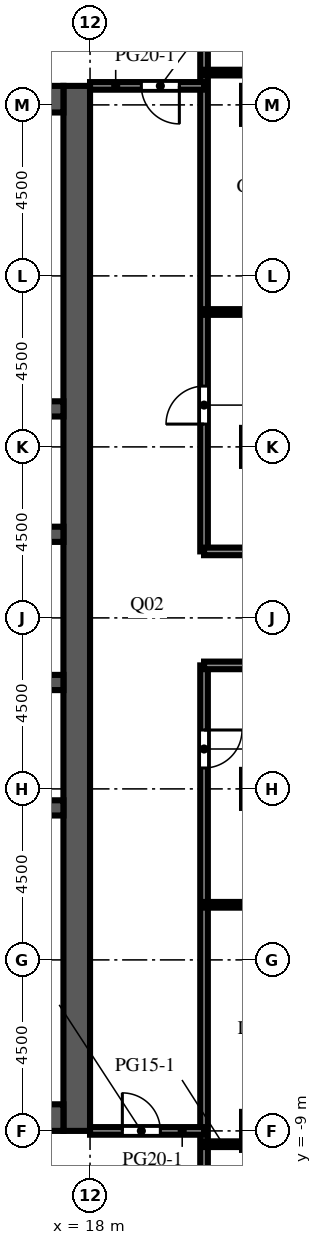
"""IFC4 building model, lengths in metres.
Left out: names, types, materials, properties, quantities, classifications, styles, units other than length and angle.
Written with IfcOpenShell. Run it as: python <this file> out.ifc"""

import sys

from ifc_helpers import new_model, si_unit, direction, frame, frame_2d, origin, place, context, subcontext, project, spatial, rectangle, extrude, element, fill, save


model = new_model("IFC4")
c1 = context("Model", 3, precision=1e-05, world=origin(), true_north=direction((0.0, 1.0)))
c2 = subcontext(c1, "Body", "Model", "MODEL_VIEW")
j1 = project(units=[si_unit("LENGTHUNIT", "METRE"), si_unit("PLANEANGLEUNIT", "RADIAN")], contexts=[c1])
p1 = place(None, origin())
s1 = spatial("IfcSite", under=j1, at=p1, CompositionType="ELEMENT")
p2 = place(p1, origin())
s2 = spatial("IfcBuilding", under=s1, at=p2, CompositionType="ELEMENT")
p3 = place(p2, frame((0.0, 0.0, 231.6)))
s3 = spatial("IfcBuildingStorey", under=s2, at=p3, CompositionType="ELEMENT", Elevation=231.6)
p4 = place(p3, frame((17.65, -9.0, 0.0), z_axis=(0.0, 0.0, 1.0), x_axis=(0.0, 1.0, 0.0)))
e1 = element("IfcWall", 1, at=p4, inside=s3, PredefinedType="SHEAR", context=c2, shape_type="SweptSolid", body=[
    extrude(rectangle(XDim=27.5, YDim=0.7, at=frame_2d((13.75, 0.0))), origin(), (0.0, 0.0, 1.0), 4.1),
])
p5 = place(p4, frame((12.55, 0.0, 0.0)))
e2 = element("IfcOpeningElement", 2, at=p5, cuts=e1, PredefinedType="OPENING", context=c2, shape_type="SweptSolid", body=[
    extrude(rectangle(XDim=2.4, YDim=2.4, at=frame_2d((1.2, 1.2))), frame((0.0, 0.36, 0.0), z_axis=(0.0, -1.0, 0.0), x_axis=(1.0, 0.0, 0.0)), (0.0, 0.0, 1.0), 0.72),
])
p6 = place(p4, frame((6.825, 0.0, 0.0)))
e3 = element("IfcOpeningElement", 3, at=p6, cuts=e1, PredefinedType="OPENING", context=c2, shape_type="SweptSolid", body=[
    extrude(rectangle(XDim=1.2, YDim=2.1, at=frame_2d((0.6, 1.05))), frame((0.0, 0.36, 0.0), z_axis=(0.0, -1.0, 0.0), x_axis=(1.0, 0.0, 0.0)), (0.0, 0.0, 1.0), 0.72),
])
p7 = place(p4, frame((19.475, 0.0, 0.0)))
e4 = element("IfcOpeningElement", 4, at=p7, cuts=e1, PredefinedType="OPENING", context=c2, shape_type="SweptSolid", body=[
    extrude(rectangle(XDim=1.2, YDim=2.1, at=frame_2d((0.6, 1.05))), frame((0.0, 0.36, 0.0), z_axis=(0.0, -1.0, 0.0), x_axis=(1.0, 0.0, 0.0)), (0.0, 0.0, 1.0), 0.72),
])
for number, where, z_axis, x_axis in (
    (5, (6.7, -8.65, 0.0), (0.0, 0.0, 1.0), (1.0, 0.0, 0.0)),
    (6, (6.7, 18.15, 0.0), (0.0, 0.0, 1.0), (1.0, 0.0, 0.0)),
):
    element("IfcWall", number, at=place(p3, frame(where, z_axis=z_axis, x_axis=x_axis)), inside=s3, PredefinedType="SHEAR", context=c2, shape_type="SweptSolid", body=[
        extrude(rectangle(XDim=10.6, YDim=0.7, at=frame_2d((5.3, 0.0))), origin(), (0.0, 0.0, 1.0), 4.1),
    ])
p8 = place(p3, frame((6.7, -0.5, 0.0), z_axis=(0.0, 0.0, 1.0), x_axis=(1.0, 0.0, 0.0)))
e7 = element("IfcWall", 7, at=p8, inside=s3, PredefinedType="SHEAR", context=c2, shape_type="SweptSolid", body=[
    extrude(rectangle(XDim=10.6, YDim=0.4, at=frame_2d((5.3, 0.0))), origin(), (0.0, 0.0, 1.0), 4.1),
])
p9 = place(p3, frame((6.7, 2.8, 0.0), z_axis=(0.0, 0.0, 1.0), x_axis=(1.0, 0.0, 0.0)))
e8 = element("IfcWall", 8, at=p9, inside=s3, PredefinedType="SHEAR", context=c2, shape_type="SweptSolid", body=[
    extrude(rectangle(XDim=10.6, YDim=0.4, at=frame_2d((5.3, 0.0))), origin(), (0.0, 0.0, 1.0), 4.1),
])
p10 = place(p9, frame((0.688, 0.0, 0.0)))
e9 = element("IfcOpeningElement", 9, at=p10, cuts=e8, PredefinedType="OPENING", context=c2, shape_type="SweptSolid", body=[
    extrude(rectangle(XDim=1.1, YDim=2.1, at=frame_2d((0.55, 1.05))), frame((0.0, 0.21, 0.0), z_axis=(0.0, -1.0, 0.0), x_axis=(1.0, 0.0, 0.0)), (0.0, 0.0, 1.0), 0.42),
])
p11 = place(p9, frame((3.438, 0.0, 0.0)))
e10 = element("IfcOpeningElement", 10, at=p11, cuts=e8, PredefinedType="OPENING", context=c2, shape_type="SweptSolid", body=[
    extrude(rectangle(XDim=1.1, YDim=2.1, at=frame_2d((0.55, 1.05))), frame((0.0, 0.21, 0.0), z_axis=(0.0, -1.0, 0.0), x_axis=(1.0, 0.0, 0.0)), (0.0, 0.0, 1.0), 0.42),
])
p12 = place(p9, frame((6.113, 0.0, 0.0)))
e11 = element("IfcOpeningElement", 11, at=p12, cuts=e8, PredefinedType="OPENING", context=c2, shape_type="SweptSolid", body=[
    extrude(rectangle(XDim=1.0, YDim=2.1, at=frame_2d((0.5, 1.05))), frame((0.0, 0.21, 0.0), z_axis=(0.0, -1.0, 0.0), x_axis=(1.0, 0.0, 0.0)), (0.0, 0.0, 1.0), 0.42),
])
p13 = place(p9, frame((8.863, 0.0, 0.0)))
e12 = element("IfcOpeningElement", 12, at=p13, cuts=e8, PredefinedType="OPENING", context=c2, shape_type="SweptSolid", body=[
    extrude(rectangle(XDim=1.0, YDim=2.1, at=frame_2d((0.5, 1.05))), frame((0.0, 0.21, 0.0), z_axis=(0.0, -1.0, 0.0), x_axis=(1.0, 0.0, 0.0)), (0.0, 0.0, 1.0), 0.42),
])
p14 = place(p3, frame((6.7, 6.7, 0.0), z_axis=(0.0, 0.0, 1.0), x_axis=(1.0, 0.0, 0.0)))
e13 = element("IfcWall", 13, at=p14, inside=s3, PredefinedType="SHEAR", context=c2, shape_type="SweptSolid", body=[
    extrude(rectangle(XDim=10.6, YDim=0.4, at=frame_2d((5.3, 0.0))), origin(), (0.0, 0.0, 1.0), 4.1),
])
p15 = place(p14, frame((3.438, 0.0, 0.0)))
e14 = element("IfcOpeningElement", 14, at=p15, cuts=e13, PredefinedType="OPENING", context=c2, shape_type="SweptSolid", body=[
    extrude(rectangle(XDim=1.1, YDim=2.1, at=frame_2d((0.55, 1.05))), frame((0.0, 0.21, 0.0), z_axis=(0.0, -1.0, 0.0), x_axis=(1.0, 0.0, 0.0)), (0.0, 0.0, 1.0), 0.42),
])
p16 = place(p14, frame((6.062, 0.0, 0.0)))
e15 = element("IfcOpeningElement", 15, at=p16, cuts=e13, PredefinedType="OPENING", context=c2, shape_type="SweptSolid", body=[
    extrude(rectangle(XDim=1.1, YDim=2.1, at=frame_2d((0.55, 1.05))), frame((0.0, 0.21, 0.0), z_axis=(0.0, -1.0, 0.0), x_axis=(1.0, 0.0, 0.0)), (0.0, 0.0, 1.0), 0.42),
])
p17 = place(p14, frame((8.812, 0.0, 0.0)))
e16 = element("IfcOpeningElement", 16, at=p17, cuts=e13, PredefinedType="OPENING", context=c2, shape_type="SweptSolid", body=[
    extrude(rectangle(XDim=1.1, YDim=2.1, at=frame_2d((0.55, 1.05))), frame((0.0, 0.21, 0.0), z_axis=(0.0, -1.0, 0.0), x_axis=(1.0, 0.0, 0.0)), (0.0, 0.0, 1.0), 0.42),
])
p18 = place(p14, frame((0.738, 0.0, 0.0)))
e17 = element("IfcOpeningElement", 17, at=p18, cuts=e13, PredefinedType="OPENING", context=c2, shape_type="SweptSolid", body=[
    extrude(rectangle(XDim=1.0, YDim=2.1, at=frame_2d((0.5, 1.05))), frame((0.0, 0.21, 0.0), z_axis=(0.0, -1.0, 0.0), x_axis=(1.0, 0.0, 0.0)), (0.0, 0.0, 1.0), 0.42),
])
p19 = place(p3, frame((6.7, 10.0, 0.0), z_axis=(0.0, 0.0, 1.0), x_axis=(1.0, 0.0, 0.0)))
e18 = element("IfcWall", 18, at=p19, inside=s3, PredefinedType="SHEAR", context=c2, shape_type="SweptSolid", body=[
    extrude(rectangle(XDim=10.6, YDim=0.4, at=frame_2d((5.3, 0.0))), origin(), (0.0, 0.0, 1.0), 4.1),
])
p20 = place(p3, frame((21.0, 3.25, 0.0), z_axis=(0.0, 0.0, 1.0), x_axis=(0.0, -1.0, 0.0)))
e19 = element("IfcWall", 19, at=p20, inside=s3, PredefinedType="PARTITIONING", context=c2, shape_type="SweptSolid", body=[
    extrude(rectangle(XDim=25.6, YDim=0.2, at=frame_2d((12.8, 0.0))), origin(), (0.0, 0.0, 1.0), 3.65),
])
p21 = place(p20, frame((1.7, 0.0, 0.0)))
e20 = element("IfcOpeningElement", 20, at=p21, cuts=e19, PredefinedType="OPENING", context=c2, shape_type="SweptSolid", body=[
    extrude(rectangle(XDim=1.0, YDim=2.1, at=frame_2d((0.5, 1.05))), frame((0.0, 0.11, 0.0), z_axis=(0.0, -1.0, 0.0), x_axis=(1.0, 0.0, 0.0)), (0.0, 0.0, 1.0), 0.22),
])
p22 = place(p3, frame((21.0, 31.35, 0.0), z_axis=(0.0, 0.0, 1.0), x_axis=(0.0, -1.0, 0.0)))
e21 = element("IfcWall", 21, at=p22, inside=s3, PredefinedType="PARTITIONING", context=c2, shape_type="SweptSolid", body=[
    extrude(rectangle(XDim=25.1, YDim=0.2, at=frame_2d((12.55, 0.0))), origin(), (0.0, 0.0, 1.0), 3.65),
])
p23 = place(p22, frame((20.75, 0.0, 0.0)))
e22 = element("IfcOpeningElement", 22, at=p23, cuts=e21, PredefinedType="OPENING", context=c2, shape_type="SweptSolid", body=[
    extrude(rectangle(XDim=1.0, YDim=2.1, at=frame_2d((0.5, 1.05))), frame((0.0, 0.11, 0.0), z_axis=(0.0, -1.0, 0.0), x_axis=(1.0, 0.0, 0.0)), (0.0, 0.0, 1.0), 0.22),
])
p24 = place(p3, frame((21.0, -9.35, 0.0), z_axis=(0.0, 0.0, 1.0), x_axis=(1.0, 0.0, 0.0)))
e23 = element("IfcWall", 23, at=p24, inside=s3, PredefinedType="PARTITIONING", context=c2, shape_type="SweptSolid", body=[
    extrude(rectangle(XDim=1.0, YDim=0.15, at=frame_2d((0.5, 0.0))), origin(), (0.0, 0.0, 1.0), 3.65),
])
p25 = place(p3, frame((21.0, -9.0, 0.0), z_axis=(0.0, 0.0, 1.0), x_axis=(-1.0, 0.0, 0.0)))
e24 = element("IfcWall", 24, at=p25, inside=s3, PredefinedType="PARTITIONING", context=c2, shape_type="SweptSolid", body=[
    extrude(rectangle(XDim=3.0, YDim=0.2, at=frame_2d((1.5, 0.0))), origin(), (0.0, 0.0, 1.0), 3.65),
])
p26 = place(p25, frame((1.15, 0.0, 0.0)))
e25 = element("IfcOpeningElement", 25, at=p26, cuts=e24, PredefinedType="OPENING", context=c2, shape_type="SweptSolid", body=[
    extrude(rectangle(XDim=1.0, YDim=2.1, at=frame_2d((0.5, 1.05))), frame((0.0, 0.11, 0.0), z_axis=(0.0, -1.0, 0.0), x_axis=(1.0, 0.0, 0.0)), (0.0, 0.0, 1.0), 0.22),
])
p27 = place(p3, frame((26.85, -3.05, 0.0), z_axis=(0.0, 0.0, 1.0), x_axis=(-1.0, 0.0, 0.0)))
e26 = element("IfcWall", 26, at=p27, inside=s3, PredefinedType="PARTITIONING", context=c2, shape_type="SweptSolid", body=[
    extrude(rectangle(XDim=5.85, YDim=0.15, at=frame_2d((2.925, 0.0))), origin(), (0.0, 0.0, 1.0), 3.65),
])
p28 = place(p27, frame((3.25, 0.0, 0.0)))
e27 = element("IfcOpeningElement", 27, at=p28, cuts=e26, PredefinedType="OPENING", context=c2, shape_type="SweptSolid", body=[
    extrude(rectangle(XDim=1.0, YDim=2.1, at=frame_2d((0.5, 1.05))), frame((0.0, 0.085, 0.0), z_axis=(0.0, -1.0, 0.0), x_axis=(1.0, 0.0, 0.0)), (0.0, 0.0, 1.0), 0.17),
])
for number, where, z_axis, x_axis in (
    (28, (21.0, 3.25, 0.0), (0.0, 0.0, 1.0), (1.0, 0.0, 0.0)),
    (29, (21.0, 6.25, 0.0), (0.0, 0.0, 1.0), (1.0, 0.0, 0.0)),
):
    element("IfcWall", number, at=place(p3, frame(where, z_axis=z_axis, x_axis=x_axis)), inside=s3, PredefinedType="PARTITIONING", context=c2, shape_type="SweptSolid", body=[
        extrude(rectangle(XDim=5.85, YDim=0.2, at=frame_2d((2.925, 0.0))), origin(), (0.0, 0.0, 1.0), 3.65),
    ])
p29 = place(p3, frame((21.0, 12.55, 0.0), z_axis=(0.0, 0.0, 1.0), x_axis=(1.0, 0.0, 0.0)))
e30 = element("IfcWall", 30, at=p29, inside=s3, PredefinedType="PARTITIONING", context=c2, shape_type="SweptSolid", body=[
    extrude(rectangle(XDim=5.85, YDim=0.15, at=frame_2d((2.925, 0.0))), origin(), (0.0, 0.0, 1.0), 3.65),
])
p30 = place(p29, frame((2.1, 0.0, 0.0)))
e31 = element("IfcOpeningElement", 31, at=p30, cuts=e30, PredefinedType="OPENING", context=c2, shape_type="SweptSolid", body=[
    extrude(rectangle(XDim=1.0, YDim=2.1, at=frame_2d((0.5, 1.05))), frame((0.0, 0.085, 0.0), z_axis=(0.0, -1.0, 0.0), x_axis=(1.0, 0.0, 0.0)), (0.0, 0.0, 1.0), 0.17),
])
p31 = place(p3, frame((18.0, 18.5, 0.0), z_axis=(0.0, 0.0, 1.0), x_axis=(1.0, 0.0, 0.0)))
e32 = element("IfcWall", 32, at=p31, inside=s3, PredefinedType="PARTITIONING", context=c2, shape_type="SweptSolid", body=[
    extrude(rectangle(XDim=3.0, YDim=0.2, at=frame_2d((1.5, 0.0))), origin(), (0.0, 0.0, 1.0), 3.65),
])
p32 = place(p31, frame((1.35, 0.0, 0.0)))
e33 = element("IfcOpeningElement", 33, at=p32, cuts=e32, PredefinedType="OPENING", context=c2, shape_type="SweptSolid", body=[
    extrude(rectangle(XDim=1.0, YDim=2.1, at=frame_2d((0.5, 1.05))), frame((0.0, 0.11, 0.0), z_axis=(0.0, -1.0, 0.0), x_axis=(1.0, 0.0, 0.0)), (0.0, 0.0, 1.0), 0.22),
])
p33 = place(p3, frame((21.0, 18.85, 0.0), z_axis=(0.0, 0.0, 1.0), x_axis=(1.0, 0.0, 0.0)))
e34 = element("IfcWall", 34, at=p33, inside=s3, PredefinedType="PARTITIONING", context=c2, shape_type="SweptSolid", body=[
    extrude(rectangle(XDim=5.85, YDim=0.15, at=frame_2d((2.925, 0.0))), origin(), (0.0, 0.0, 1.0), 3.65),
])
p34 = place(p33, frame((2.6, 0.0, 0.0)))
e35 = element("IfcOpeningElement", 35, at=p34, cuts=e34, PredefinedType="OPENING", context=c2, shape_type="SweptSolid", body=[
    extrude(rectangle(XDim=1.0, YDim=2.1, at=frame_2d((0.5, 1.05))), frame((0.0, 0.085, 0.0), z_axis=(0.0, -1.0, 0.0), x_axis=(1.0, 0.0, 0.0)), (0.0, 0.0, 1.0), 0.17),
])
p35 = place(p5, origin())
e36 = element("IfcDoor", 36, at=p35, inside=s3, OperationType="DOUBLE_DOOR_DOUBLE_SWING", PredefinedType="DOOR", context=c2, shape_type="SweptSolid", body=[
    extrude(rectangle(XDim=2.4, YDim=2.4, at=frame_2d((1.2, 1.2))), frame((0.0, 0.025, 0.0), z_axis=(0.0, -1.0, 0.0), x_axis=(1.0, 0.0, 0.0)), (0.0, 0.0, 1.0), 0.05),
])
fill(e2, e36)
p36 = place(p6, frame((1.2, 0.0, 0.0), z_axis=(0.0, 0.0, 1.0), x_axis=(-1.0, 0.0, 0.0)))
e37 = element("IfcDoor", 37, at=p36, inside=s3, OperationType="SINGLE_SWING_LEFT", PredefinedType="DOOR", context=c2, shape_type="SweptSolid", body=[
    extrude(rectangle(XDim=1.2, YDim=2.1, at=frame_2d((0.6, 1.05))), frame((0.0, 0.025, 0.0), z_axis=(0.0, -1.0, 0.0), x_axis=(1.0, 0.0, 0.0)), (0.0, 0.0, 1.0), 0.05),
])
fill(e3, e37)
p37 = place(p7, frame((1.2, 0.0, 0.0), z_axis=(0.0, 0.0, 1.0), x_axis=(-1.0, 0.0, 0.0)))
e38 = element("IfcDoor", 38, at=p37, inside=s3, OperationType="SINGLE_SWING_LEFT", PredefinedType="DOOR", context=c2, shape_type="SweptSolid", body=[
    extrude(rectangle(XDim=1.2, YDim=2.1, at=frame_2d((0.6, 1.05))), frame((0.0, 0.025, 0.0), z_axis=(0.0, -1.0, 0.0), x_axis=(1.0, 0.0, 0.0)), (0.0, 0.0, 1.0), 0.05),
])
fill(e4, e38)
p38 = place(p26, origin())
e39 = element("IfcDoor", 39, at=p38, inside=s3, OperationType="SINGLE_SWING_RIGHT", PredefinedType="DOOR", context=c2, shape_type="SweptSolid", body=[
    extrude(rectangle(XDim=1.0, YDim=2.1, at=frame_2d((0.5, 1.05))), frame((0.0, 0.025, 0.0), z_axis=(0.0, -1.0, 0.0), x_axis=(1.0, 0.0, 0.0)), (0.0, 0.0, 1.0), 0.05),
])
fill(e25, e39)
p39 = place(p32, origin())
e40 = element("IfcDoor", 40, at=p39, inside=s3, OperationType="SINGLE_SWING_RIGHT", PredefinedType="DOOR", context=c2, shape_type="SweptSolid", body=[
    extrude(rectangle(XDim=1.0, YDim=2.1, at=frame_2d((0.5, 1.05))), frame((0.0, 0.025, 0.0), z_axis=(0.0, -1.0, 0.0), x_axis=(1.0, 0.0, 0.0)), (0.0, 0.0, 1.0), 0.05),
])
fill(e33, e40)
p40 = place(p21, origin())
e41 = element("IfcDoor", 41, at=p40, inside=s3, OperationType="SINGLE_SWING_LEFT", PredefinedType="DOOR", context=c2, shape_type="SweptSolid", body=[
    extrude(rectangle(XDim=1.0, YDim=2.1, at=frame_2d((0.5, 1.05))), frame((0.0, 0.025, 0.0), z_axis=(0.0, -1.0, 0.0), x_axis=(1.0, 0.0, 0.0)), (0.0, 0.0, 1.0), 0.05),
])
fill(e20, e41)
p41 = place(p23, origin())
e42 = element("IfcDoor", 42, at=p41, inside=s3, OperationType="SINGLE_SWING_RIGHT", PredefinedType="DOOR", context=c2, shape_type="SweptSolid", body=[
    extrude(rectangle(XDim=1.0, YDim=2.1, at=frame_2d((0.5, 1.05))), frame((0.0, 0.025, 0.0), z_axis=(0.0, -1.0, 0.0), x_axis=(1.0, 0.0, 0.0)), (0.0, 0.0, 1.0), 0.05),
])
fill(e22, e42)
save(model, sys.argv[1])
